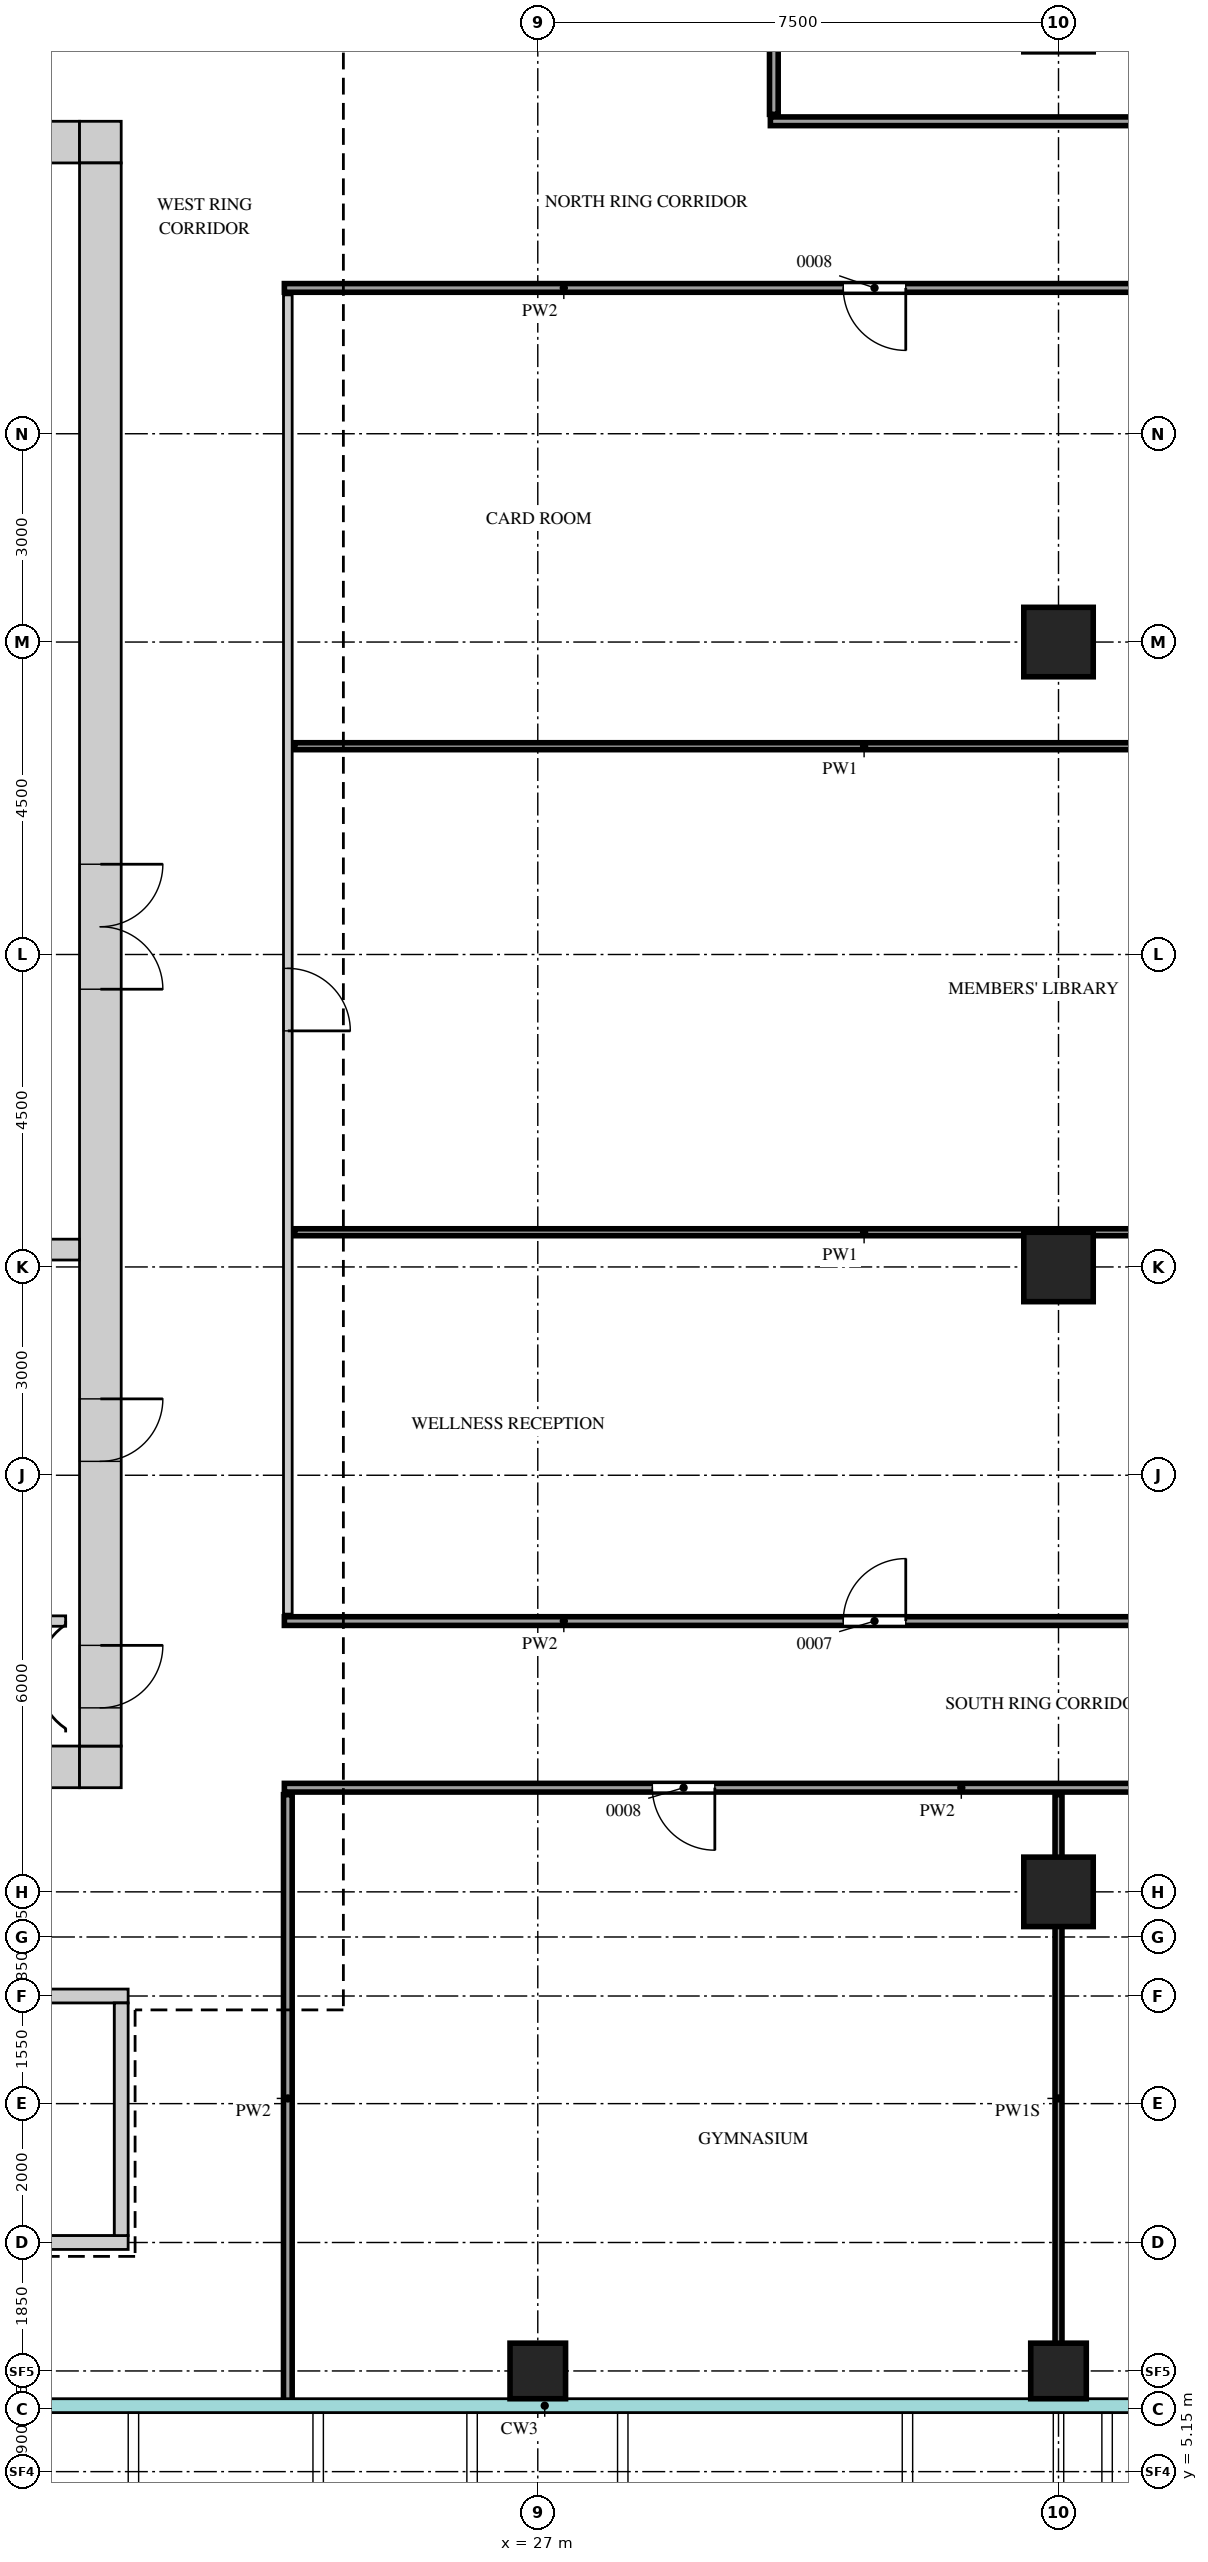
"""IFC4 building model, lengths in metres.
Left out: names, types, materials, properties, quantities, classifications, styles, units other than length and angle.
Written with IfcOpenShell. Run it as: python <this file> out.ifc"""

import sys

from ifc_helpers import new_model, si_unit, direction, frame, frame_2d, origin, origin_2d, place, context, subcontext, project, spatial, rectangle, extrude, source, transform, mapped, element, fill, save


model = new_model("IFC4")
c1 = context("Model", 3, precision=1e-05, world=origin(), true_north=direction((0.0, 1.0)))
c2 = subcontext(c1, "Body", "Model", "MODEL_VIEW")
j1 = project(units=[si_unit("LENGTHUNIT", "METRE"), si_unit("PLANEANGLEUNIT", "RADIAN")], contexts=[c1])
p1 = place(None, origin())
s1 = spatial("IfcSite", under=j1, at=p1, CompositionType="ELEMENT")
p2 = place(p1, origin())
s2 = spatial("IfcBuilding", under=s1, at=p2, CompositionType="ELEMENT")
p3 = place(p2, frame((0.0, 0.0, 294.2)))
s3 = spatial("IfcBuildingStorey", under=s2, at=p3, CompositionType="ELEMENT", Elevation=294.2)
m1 = source(origin(), c2, "Body", "SweptSolid", [
    extrude(rectangle(XDim=14.4, YDim=0.6, at=frame_2d((7.2, 0.0))), origin(), (0.0, 0.0, 1.0), 3.75),
])
p4 = place(p3, frame((6.0, 38.7, 0.0), z_axis=(0.0, 0.0, 1.0), x_axis=(1.0, 0.0, 0.0)))
e1 = element("IfcWall", 1, at=p4, inside=s3, PredefinedType="SHEAR", context=c2, shape_type="MappedRepresentation", body=[
    mapped(m1, transform((0.0, 0.0, 0.0))),
])
m2 = source(origin(), c2, "Body", "SweptSolid", [
    extrude(rectangle(XDim=0.9, YDim=2.1, at=frame_2d((0.45, 1.05))), frame((0.0, 0.31, 0.0), z_axis=(0.0, -1.0, 0.0), x_axis=(1.0, 0.0, 0.0)), (0.0, 0.0, 1.0), 0.62),
])
p5 = place(p4, frame((3.7, 0.0, 0.0)))
e2 = element("IfcOpeningElement", 2, at=p5, cuts=e1, PredefinedType="OPENING", context=c2, shape_type="MappedRepresentation", body=[
    mapped(m2, transform((0.0, 0.0, 0.0))),
])
p6 = place(p4, frame((8.7, 0.0, 0.0)))
e3 = element("IfcOpeningElement", 3, at=p6, cuts=e1, PredefinedType="OPENING", context=c2, shape_type="MappedRepresentation", body=[
    mapped(m2, transform((0.0, 0.0, 0.0))),
])
p7 = place(p4, frame((12.05, 0.0, 0.0)))
e4 = element("IfcOpeningElement", 4, at=p7, cuts=e1, PredefinedType="OPENING", context=c2, shape_type="MappedRepresentation", body=[
    mapped(m2, transform((0.0, 0.0, 0.0))),
])
m3 = source(origin(), c2, "Body", "SweptSolid", [
    extrude(rectangle(XDim=0.6, YDim=0.6, at=frame_2d((0.3, 0.0))), origin(), (0.0, 0.0, 1.0), 3.75),
])
p8 = place(p3, frame((20.4, 38.7, 0.0), z_axis=(0.0, 0.0, 1.0), x_axis=(1.0, 0.0, 0.0)))
e5 = element("IfcWall", 5, at=p8, inside=s3, PredefinedType="SHEAR", context=c2, shape_type="MappedRepresentation", body=[
    mapped(m3, transform((0.0, 0.0, 0.0))),
])
p9 = place(p3, frame((6.0, 15.3, 0.0), z_axis=(0.0, 0.0, 1.0), x_axis=(1.0, 0.0, 0.0)))
e6 = element("IfcWall", 6, at=p9, inside=s3, PredefinedType="SHEAR", context=c2, shape_type="MappedRepresentation", body=[
    mapped(m1, transform((0.0, 0.0, 0.0))),
])
m4 = source(origin(), c2, "Body", "SweptSolid", [
    extrude(rectangle(XDim=1.2, YDim=2.1, at=frame_2d((0.6, 1.05))), frame((0.0, 0.31, 0.0), z_axis=(0.0, -1.0, 0.0), x_axis=(1.0, 0.0, 0.0)), (0.0, 0.0, 1.0), 0.62),
])
p10 = place(p9, frame((6.2, 0.0, 0.0)))
e7 = element("IfcOpeningElement", 7, at=p10, cuts=e6, PredefinedType="OPENING", context=c2, shape_type="MappedRepresentation", body=[
    mapped(m4, transform((0.0, 0.0, 0.0))),
])
p11 = place(p9, frame((2.85, 0.0, 0.0)))
e8 = element("IfcOpeningElement", 8, at=p11, cuts=e6, PredefinedType="OPENING", context=c2, shape_type="MappedRepresentation", body=[
    mapped(m4, transform((0.0, 0.0, 0.0))),
])
m5 = source(origin(), c2, "Body", "SweptSolid", [
    extrude(rectangle(XDim=1.0, YDim=2.1, at=frame_2d((0.5, 1.05))), frame((0.0, 0.31, 0.0), z_axis=(0.0, -1.0, 0.0), x_axis=(1.0, 0.0, 0.0)), (0.0, 0.0, 1.0), 0.62),
])
p12 = place(p9, frame((8.7, 0.0, 0.0)))
e9 = element("IfcOpeningElement", 9, at=p12, cuts=e6, PredefinedType="OPENING", context=c2, shape_type="MappedRepresentation", body=[
    mapped(m5, transform((0.0, 0.0, 0.0))),
])
p13 = place(p3, frame((20.4, 15.3, 0.0), z_axis=(0.0, 0.0, 1.0), x_axis=(1.0, 0.0, 0.0)))
e10 = element("IfcWall", 10, at=p13, inside=s3, PredefinedType="SHEAR", context=c2, shape_type="MappedRepresentation", body=[
    mapped(m3, transform((0.0, 0.0, 0.0))),
])
m6 = source(origin(), c2, "Body", "SweptSolid", [
    extrude(rectangle(XDim=22.8, YDim=0.6, at=frame_2d((11.4, 0.0))), origin(), (0.0, 0.0, 1.0), 3.75),
])
p14 = place(p3, frame((20.7, 15.6, 0.0), z_axis=(0.0, 0.0, 1.0), x_axis=(0.0, 1.0, 0.0)))
e11 = element("IfcWall", 11, at=p14, inside=s3, PredefinedType="SHEAR", context=c2, shape_type="MappedRepresentation", body=[
    mapped(m6, transform((0.0, 0.0, 0.0))),
])
m7 = source(origin(), c2, "Body", "SweptSolid", [
    extrude(rectangle(XDim=1.8, YDim=2.1, at=frame_2d((0.9, 1.05))), frame((0.0, 0.31, 0.0), z_axis=(0.0, -1.0, 0.0), x_axis=(1.0, 0.0, 0.0)), (0.0, 0.0, 1.0), 0.62),
])
p15 = place(p14, frame((10.9, 0.0, 0.0)))
e12 = element("IfcOpeningElement", 12, at=p15, cuts=e11, PredefinedType="OPENING", context=c2, shape_type="MappedRepresentation", body=[
    mapped(m7, transform((0.0, 0.0, 0.0))),
])
p16 = place(p14, frame((0.55, 0.0, 0.0)))
e13 = element("IfcOpeningElement", 13, at=p16, cuts=e11, PredefinedType="OPENING", context=c2, shape_type="MappedRepresentation", body=[
    mapped(m2, transform((0.0, 0.0, 0.0))),
])
p17 = place(p14, frame((4.1, 0.0, 0.0)))
e14 = element("IfcOpeningElement", 14, at=p17, cuts=e11, PredefinedType="OPENING", context=c2, shape_type="MappedRepresentation", body=[
    mapped(m2, transform((0.0, 0.0, 0.0))),
])
m8 = source(origin(), c2, "Body", "SweptSolid", [
    extrude(rectangle(XDim=7.2, YDim=0.2, at=frame_2d((3.6, 0.0))), origin(), (0.0, 0.0, 1.0), 3.75),
])
p18 = place(p3, frame((13.9, 12.0, 0.0), z_axis=(0.0, 0.0, 1.0), x_axis=(1.0, 0.0, 0.0)))
e15 = element("IfcWall", 15, at=p18, inside=s3, PredefinedType="SHEAR", context=c2, shape_type="MappedRepresentation", body=[
    mapped(m8, transform((0.0, 0.0, 0.0))),
])
p19 = place(p3, frame((13.9, 8.45, 0.0), z_axis=(0.0, 0.0, 1.0), x_axis=(1.0, 0.0, 0.0)))
e16 = element("IfcWall", 16, at=p19, inside=s3, PredefinedType="SHEAR", context=c2, shape_type="MappedRepresentation", body=[
    mapped(m8, transform((0.0, 0.0, 0.0))),
])
m9 = source(origin(), c2, "Body", "SweptSolid", [
    extrude(rectangle(XDim=1.2, YDim=2.1, at=frame_2d((0.6, 1.05))), frame((0.0, 0.11, 0.0), z_axis=(0.0, -1.0, 0.0), x_axis=(1.0, 0.0, 0.0)), (0.0, 0.0, 1.0), 0.22),
])
p20 = place(p19, frame((0.35, 0.0, 0.0)))
e17 = element("IfcOpeningElement", 17, at=p20, cuts=e16, PredefinedType="OPENING", context=c2, shape_type="MappedRepresentation", body=[
    mapped(m9, transform((0.0, 0.0, 0.0))),
])
m10 = source(origin(), c2, "Body", "SweptSolid", [
    extrude(rectangle(XDim=3.35, YDim=0.2, at=frame_2d((1.675, 0.0))), origin(), (0.0, 0.0, 1.0), 3.75),
])
p21 = place(p3, frame((21.0, 8.55, 0.0), z_axis=(0.0, 0.0, 1.0), x_axis=(0.0, 1.0, 0.0)))
e18 = element("IfcWall", 18, at=p21, inside=s3, PredefinedType="SHEAR", context=c2, shape_type="MappedRepresentation", body=[
    mapped(m10, transform((0.0, 0.0, 0.0))),
])
m11 = source(origin(), c2, "Body", "SweptSolid", [
    extrude(rectangle(XDim=13.2, YDim=0.3, at=frame_2d((6.6, 0.0))), origin(), (0.0, 0.0, 1.0), 3.75),
])
p22 = place(p3, frame((7.2, 22.75, 0.0), z_axis=(0.0, 0.0, 1.0), x_axis=(1.0, 0.0, 0.0)))
e19 = element("IfcWall", 19, at=p22, inside=s3, PredefinedType="STANDARD", context=c2, shape_type="MappedRepresentation", body=[
    mapped(m11, transform((0.0, 0.0, 0.0))),
])
m12 = source(origin(), c2, "Body", "SweptSolid", [
    extrude(rectangle(XDim=0.8, YDim=0.8, at=origin_2d()), origin(), (0.0, 0.0, 1.0), 3.75),
])
for number, where, z_axis, x_axis in (
    (20, (27.0, 6.6, 0.0), (0.0, 0.0, 1.0), (1.0, 0.0, 0.0)),
    (21, (34.5, 6.6, 0.0), (0.0, 0.0, 1.0), (1.0, 0.0, 0.0)),
):
    element("IfcColumn", number, at=place(p3, frame(where, z_axis=z_axis, x_axis=x_axis)), inside=s3, PredefinedType="COLUMN", context=c2, shape_type="MappedRepresentation", body=[
        mapped(m12, transform((0.0, 0.0, 0.0))),
    ])
m13 = source(origin(), c2, "Body", "SweptSolid", [
    extrude(rectangle(XDim=1.0, YDim=1.0, at=origin_2d()), origin(), (0.0, 0.0, 1.0), 3.75),
])
for number, where, z_axis, x_axis in (
    (22, (34.5, 13.5, 0.0), (0.0, 0.0, 1.0), (1.0, 0.0, 0.0)),
    (23, (34.5, 22.5, 0.0), (0.0, 0.0, 1.0), (1.0, 0.0, 0.0)),
    (24, (34.5, 31.5, 0.0), (0.0, 0.0, 1.0), (1.0, 0.0, 0.0)),
):
    element("IfcColumn", number, at=place(p3, frame(where, z_axis=z_axis, x_axis=x_axis)), inside=s3, PredefinedType="COLUMN", context=c2, shape_type="MappedRepresentation", body=[
        mapped(m13, transform((0.0, 0.0, 0.0))),
    ])
m14 = source(origin(), c2, "Body", "SweptSolid", [
    extrude(rectangle(XDim=8.75, YDim=0.125, at=frame_2d((4.375, 0.0))), origin(), (0.0, 0.0, 1.0), 3.8),
])
p23 = place(p3, frame((23.4, 6.15, 0.0), z_axis=(0.0, 0.0, 1.0), x_axis=(0.0, 1.0, 0.0)))
e25 = element("IfcWall", 25, at=p23, inside=s3, PredefinedType="PARTITIONING", context=c2, shape_type="MappedRepresentation", body=[
    mapped(m14, transform((0.0, 0.0, 0.0))),
])
m15 = source(origin(), c2, "Body", "SweptSolid", [
    extrude(rectangle(XDim=8.75, YDim=0.1, at=frame_2d((4.375, 0.0))), origin(), (0.0, 0.0, 1.0), 3.35),
])
p24 = place(p3, frame((34.5, 6.15, 0.0), z_axis=(0.0, 0.0, 1.0), x_axis=(0.0, 1.0, 0.0)))
e26 = element("IfcWall", 26, at=p24, inside=s3, PredefinedType="PARTITIONING", context=c2, shape_type="MappedRepresentation", body=[
    mapped(m15, transform((0.0, 0.0, 0.0))),
])
m16 = source(origin(), c2, "Body", "SweptSolid", [
    extrude(rectangle(XDim=19.1, YDim=0.125, at=frame_2d((9.55, 0.0))), origin(), (0.0, 0.0, 1.0), 3.8),
])
p25 = place(p3, frame((23.35, 15.0, 0.0), z_axis=(0.0, 0.0, 1.0), x_axis=(1.0, 0.0, 0.0)))
e27 = element("IfcWall", 27, at=p25, inside=s3, PredefinedType="PARTITIONING", context=c2, shape_type="MappedRepresentation", body=[
    mapped(m16, transform((0.0, 0.0, 0.0))),
])
m17 = source(origin(), c2, "Body", "SweptSolid", [
    extrude(rectangle(XDim=0.9, YDim=2.1, at=frame_2d((0.45, 1.05))), frame((0.0, 0.073, 0.0), z_axis=(0.0, -1.0, 0.0), x_axis=(1.0, 0.0, 0.0)), (0.0, 0.0, 1.0), 0.145),
])
p26 = place(p25, frame((5.3, 0.0, 0.0)))
e28 = element("IfcOpeningElement", 28, at=p26, cuts=e27, PredefinedType="OPENING", context=c2, shape_type="MappedRepresentation", body=[
    mapped(m17, transform((0.0, 0.0, 0.0))),
])
p27 = place(p25, frame((13.3, 0.0, 0.0)))
e29 = element("IfcOpeningElement", 29, at=p27, cuts=e27, PredefinedType="OPENING", context=c2, shape_type="MappedRepresentation", body=[
    mapped(m17, transform((0.0, 0.0, 0.0))),
])
p28 = place(p25, frame((17.95, 0.0, 0.0)))
e30 = element("IfcOpeningElement", 30, at=p28, cuts=e27, PredefinedType="OPENING", context=c2, shape_type="MappedRepresentation", body=[
    mapped(m17, transform((0.0, 0.0, 0.0))),
])
m18 = source(origin(), c2, "Body", "SweptSolid", [
    extrude(rectangle(XDim=4.0, YDim=0.15, at=frame_2d((2.0, 0.0))), origin(), (0.0, 0.0, 1.0), 3.8),
])
p29 = place(p3, frame((16.2, 17.4, 0.0), z_axis=(0.0, 0.0, 1.0), x_axis=(1.0, 0.0, 0.0)))
e31 = element("IfcWall", 31, at=p29, inside=s3, PredefinedType="PARTITIONING", context=c2, shape_type="MappedRepresentation", body=[
    mapped(m18, transform((0.0, 0.0, 0.0))),
])
m19 = source(origin(), c2, "Body", "SweptSolid", [
    extrude(rectangle(XDim=16.7, YDim=0.125, at=frame_2d((8.35, 0.0))), origin(), (0.0, 0.0, 1.0), 3.8),
])
p30 = place(p3, frame((23.35, 17.4, 0.0), z_axis=(0.0, 0.0, 1.0), x_axis=(1.0, 0.0, 0.0)))
e32 = element("IfcWall", 32, at=p30, inside=s3, PredefinedType="PARTITIONING", context=c2, shape_type="MappedRepresentation", body=[
    mapped(m19, transform((0.0, 0.0, 0.0))),
])
p31 = place(p30, frame((8.05, 0.0, 0.0)))
e33 = element("IfcOpeningElement", 33, at=p31, cuts=e32, PredefinedType="OPENING", context=c2, shape_type="MappedRepresentation", body=[
    mapped(m17, transform((0.0, 0.0, 0.0))),
])
m20 = source(origin(), c2, "Body", "SweptSolid", [
    extrude(rectangle(XDim=19.0, YDim=0.125, at=frame_2d((9.5, 0.0))), origin(), (0.0, 0.0, 1.0), 3.8),
])
p32 = place(p3, frame((23.4, 17.5, 0.0), z_axis=(0.0, 0.0, 1.0), x_axis=(0.0, 1.0, 0.0)))
e34 = element("IfcWall", 34, at=p32, inside=s3, PredefinedType="PARTITIONING", context=c2, shape_type="MappedRepresentation", body=[
    mapped(m20, transform((0.0, 0.0, 0.0))),
])
p33 = place(p32, frame((8.4, 0.0, 0.0)))
e35 = element("IfcOpeningElement", 35, at=p33, cuts=e34, PredefinedType="OPENING", context=c2, shape_type="MappedRepresentation", body=[
    mapped(m17, transform((0.0, 0.0, 0.0))),
])
m21 = source(origin(), c2, "Body", "SweptSolid", [
    extrude(rectangle(XDim=16.4, YDim=0.1, at=frame_2d((8.2, 0.0))), origin(), (0.0, 0.0, 1.0), 3.8),
])
for number, where, z_axis, x_axis in (
    (36, (23.5, 23.0, 0.0), (0.0, 0.0, 1.0), (1.0, 0.0, 0.0)),
    (37, (23.5, 30.0, 0.0), (0.0, 0.0, 1.0), (1.0, 0.0, 0.0)),
):
    element("IfcWall", number, at=place(p3, frame(where, z_axis=z_axis, x_axis=x_axis)), inside=s3, PredefinedType="PARTITIONING", context=c2, shape_type="MappedRepresentation", body=[
        mapped(m21, transform((0.0, 0.0, 0.0))),
    ])
p34 = place(p3, frame((23.35, 36.6, 0.0), z_axis=(0.0, 0.0, 1.0), x_axis=(1.0, 0.0, 0.0)))
e38 = element("IfcWall", 38, at=p34, inside=s3, PredefinedType="PARTITIONING", context=c2, shape_type="MappedRepresentation", body=[
    mapped(m19, transform((0.0, 0.0, 0.0))),
])
p35 = place(p34, frame((8.05, 0.0, 0.0)))
e39 = element("IfcOpeningElement", 39, at=p35, cuts=e38, PredefinedType="OPENING", context=c2, shape_type="MappedRepresentation", body=[
    mapped(m17, transform((0.0, 0.0, 0.0))),
])
m22 = source(origin(), c2, "Body", "SweptSolid", [
    extrude(rectangle(XDim=12.1, YDim=0.125, at=frame_2d((6.05, 0.0))), origin(), (0.0, 0.0, 1.0), 3.8),
])
p36 = place(p3, frame((30.35, 39.0, 0.0), z_axis=(0.0, 0.0, 1.0), x_axis=(1.0, 0.0, 0.0)))
e40 = element("IfcWall", 40, at=p36, inside=s3, PredefinedType="PARTITIONING", context=c2, shape_type="MappedRepresentation", body=[
    mapped(m22, transform((0.0, 0.0, 0.0))),
])
m23 = source(origin(), c2, "Body", "SweptSolid", [
    extrude(rectangle(XDim=1.2, YDim=2.1, at=frame_2d((0.6, 1.05))), frame((0.0, 0.073, 0.0), z_axis=(0.0, -1.0, 0.0), x_axis=(1.0, 0.0, 0.0)), (0.0, 0.0, 1.0), 0.145),
])
p37 = place(p36, frame((5.25, 0.0, 0.0)))
e41 = element("IfcOpeningElement", 41, at=p37, cuts=e40, PredefinedType="OPENING", context=c2, shape_type="MappedRepresentation", body=[
    mapped(m23, transform((0.0, 0.0, 0.0))),
])
p38 = place(p3, frame((30.4, 39.1, 0.0), z_axis=(0.0, 0.0, 1.0), x_axis=(0.0, 1.0, 0.0)))
e42 = element("IfcWall", 42, at=p38, inside=s3, PredefinedType="PARTITIONING", context=c2, shape_type="MappedRepresentation", body=[
    mapped(m14, transform((0.0, 0.0, 0.0))),
])
m24 = source(origin(), c2, "Body", "SweptSolid", [
    extrude(rectangle(XDim=1.8, YDim=2.1, at=frame_2d((0.9, 1.05))), frame((0.0, 0.25, 0.0), z_axis=(0.0, -1.0, 0.0), x_axis=(1.0, 0.0, 0.0)), (0.0, 0.0, 1.0), 0.5),
])
p39 = place(p15, origin())
e43 = element("IfcDoor", 43, at=p39, inside=s3, OperationType="DOUBLE_DOOR_SINGLE_SWING", PredefinedType="DOOR", context=c2, shape_type="MappedRepresentation", body=[
    mapped(m24, transform((0.0, 0.0, 0.0))),
])
fill(e12, e43)
m25 = source(origin(), c2, "Body", "SweptSolid", [
    extrude(rectangle(XDim=0.9, YDim=2.1, at=frame_2d((0.45, 1.05))), frame((0.0, 0.25, 0.0), z_axis=(0.0, -1.0, 0.0), x_axis=(1.0, 0.0, 0.0)), (0.0, 0.0, 1.0), 0.5),
])
p40 = place(p16, origin())
e44 = element("IfcDoor", 44, at=p40, inside=s3, OperationType="SINGLE_SWING_RIGHT", PredefinedType="DOOR", context=c2, shape_type="MappedRepresentation", body=[
    mapped(m25, transform((0.0, 0.0, 0.0))),
])
fill(e13, e44)
p41 = place(p17, origin())
e45 = element("IfcDoor", 45, at=p41, inside=s3, OperationType="SINGLE_SWING_RIGHT", PredefinedType="DOOR", context=c2, shape_type="MappedRepresentation", body=[
    mapped(m25, transform((0.0, 0.0, 0.0))),
])
fill(e14, e45)
m26 = source(origin(), c2, "Body", "SweptSolid", [
    extrude(rectangle(XDim=0.9, YDim=2.1, at=frame_2d((0.45, 1.05))), frame((0.0, 0.025, 0.0), z_axis=(0.0, -1.0, 0.0), x_axis=(1.0, 0.0, 0.0)), (0.0, 0.0, 1.0), 0.05),
])
p42 = place(p26, origin())
e46 = element("IfcDoor", 46, at=p42, inside=s3, OperationType="SINGLE_SWING_RIGHT", PredefinedType="DOOR", context=c2, shape_type="MappedRepresentation", body=[
    mapped(m26, transform((0.0, 0.0, 0.0))),
])
fill(e28, e46)
p43 = place(p31, origin())
e47 = element("IfcDoor", 47, at=p43, inside=s3, OperationType="SINGLE_SWING_LEFT", PredefinedType="DOOR", context=c2, shape_type="MappedRepresentation", body=[
    mapped(m26, transform((0.0, 0.0, 0.0))),
])
fill(e33, e47)
p44 = place(p33, origin())
e48 = element("IfcDoor", 48, at=p44, inside=s3, OperationType="SINGLE_SWING_LEFT", PredefinedType="DOOR", context=c2, shape_type="MappedRepresentation", body=[
    mapped(m26, transform((0.0, 0.0, 0.0))),
])
fill(e35, e48)
p45 = place(p35, origin())
e49 = element("IfcDoor", 49, at=p45, inside=s3, OperationType="SINGLE_SWING_RIGHT", PredefinedType="DOOR", context=c2, shape_type="MappedRepresentation", body=[
    mapped(m26, transform((0.0, 0.0, 0.0))),
])
fill(e39, e49)
save(model, sys.argv[1])
